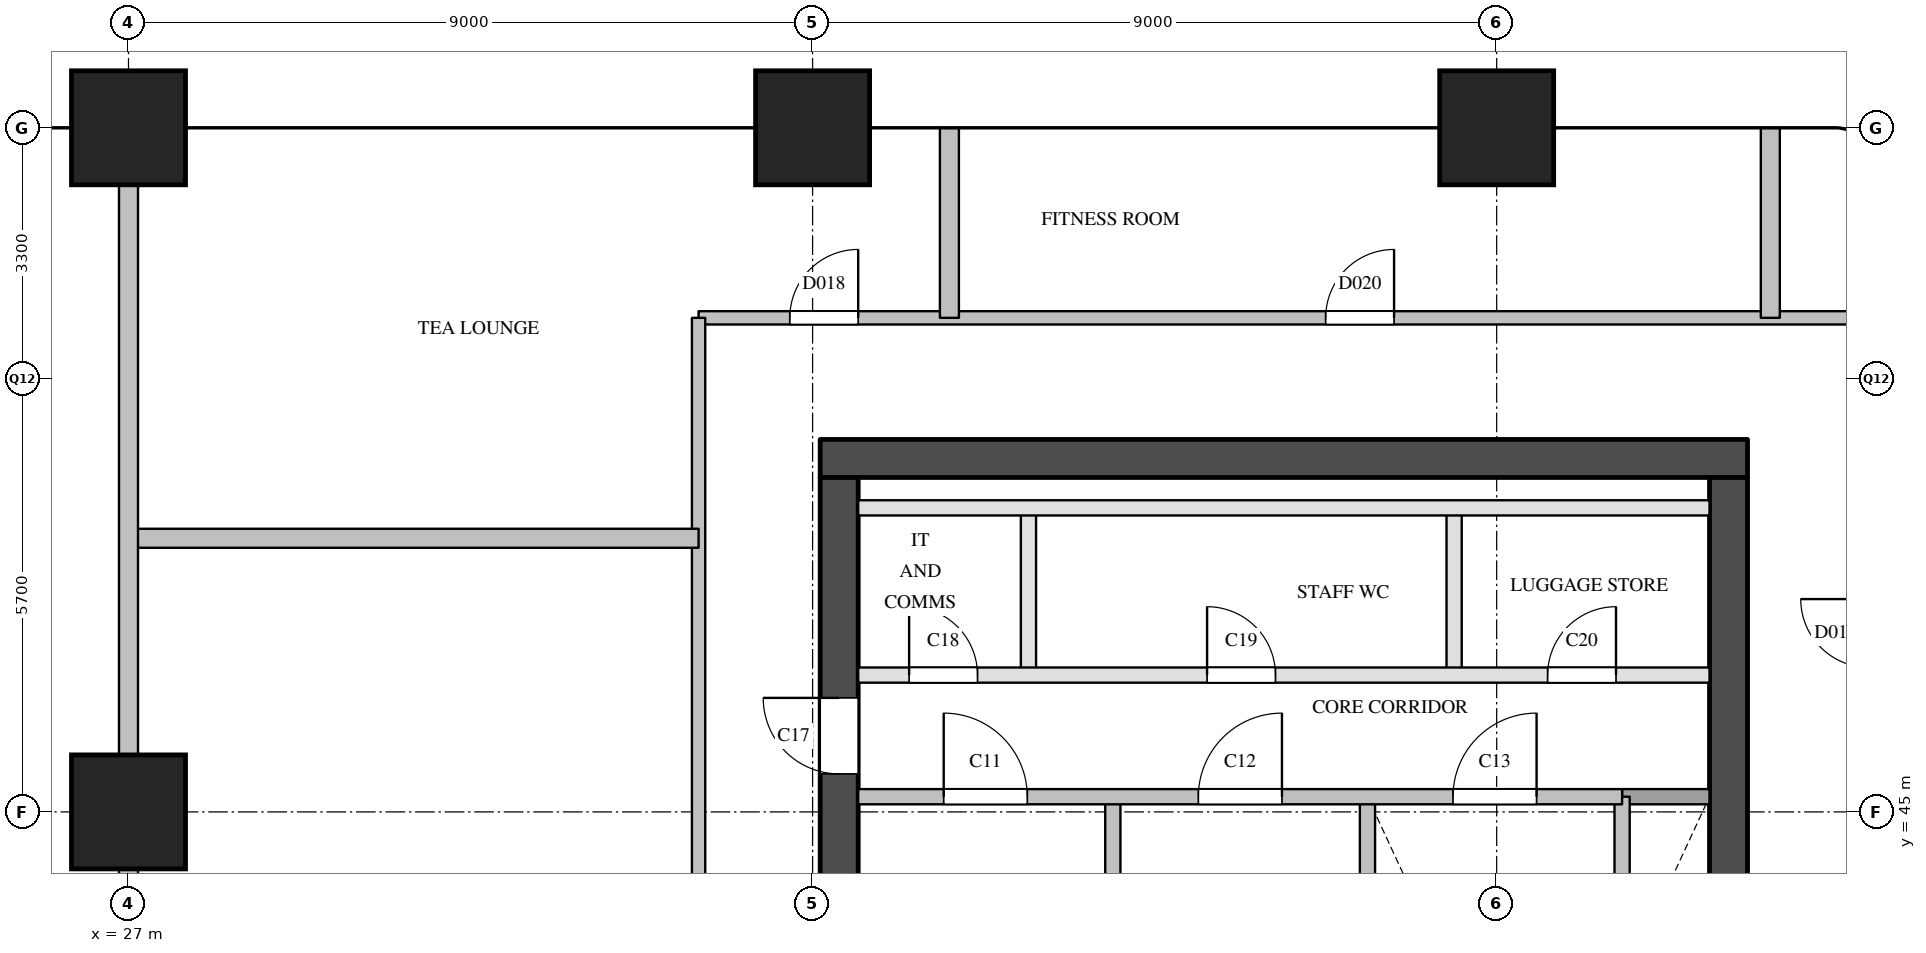
"""IFC4 building model, lengths in metres.
Left out: names, types, materials, properties, quantities, classifications, styles, units other than length and angle.
Written with IfcOpenShell. Run it as: python <this file> out.ifc"""

import sys

from ifc_helpers import new_model, si_unit, direction, frame, frame_2d, origin, origin_2d, place, context, subcontext, project, spatial, rectangle, extrude, element, fill, save


model = new_model("IFC4")
c1 = context("Model", 3, precision=1e-05, world=origin(), true_north=direction((0.0, 1.0)))
c2 = subcontext(c1, "Body", "Model", "MODEL_VIEW")
j1 = project(units=[si_unit("LENGTHUNIT", "METRE"), si_unit("PLANEANGLEUNIT", "RADIAN")], contexts=[c1])
p1 = place(None, origin())
s1 = spatial("IfcSite", under=j1, at=p1, CompositionType="ELEMENT")
p2 = place(p1, origin())
s2 = spatial("IfcBuilding", under=s1, at=p2, CompositionType="ELEMENT")
p3 = place(p2, frame((0.0, 0.0, 162.2)))
s3 = spatial("IfcBuildingStorey", under=s2, at=p3, CompositionType="ELEMENT", Elevation=162.2)
for number, where, z_axis, x_axis in (
    (1, (27.0, 45.0, 0.0), (0.0, 0.0, 1.0), (1.0, 0.0, 0.0)),
    (2, (27.0, 54.0, 0.0), (0.0, 0.0, 1.0), (1.0, 0.0, 0.0)),
    (3, (36.0, 54.0, 0.0), (0.0, 0.0, 1.0), (1.0, 0.0, 0.0)),
    (4, (45.0, 54.0, 0.0), (0.0, 0.0, 1.0), (1.0, 0.0, 0.0)),
):
    element("IfcColumn", number, at=place(p3, frame(where, z_axis=z_axis, x_axis=x_axis)), inside=s3, PredefinedType="COLUMN", context=c2, shape_type="SweptSolid", body=[
        extrude(rectangle(XDim=1.5, YDim=1.5, at=origin_2d()), origin(), (0.0, 0.0, 1.0), 3.9),
    ])
p4 = place(p3, frame((36.1, 49.65, 0.0), z_axis=(0.0, 0.0, 1.0), x_axis=(1.0, 0.0, 0.0)))
e5 = element("IfcWall", 5, at=p4, inside=s3, PredefinedType="SHEAR", context=c2, shape_type="SweptSolid", body=[
    extrude(rectangle(XDim=12.2, YDim=0.5, at=frame_2d((6.1, 0.0))), origin(), (0.0, 0.0, 1.0), 3.6),
])
p5 = place(p3, frame((36.35, 29.1, 0.0), z_axis=(0.0, 0.0, 1.0), x_axis=(0.0, 1.0, 0.0)))
e6 = element("IfcWall", 6, at=p5, inside=s3, PredefinedType="SHEAR", context=c2, shape_type="SweptSolid", body=[
    extrude(rectangle(XDim=20.3, YDim=0.5, at=frame_2d((10.15, 0.0))), origin(), (0.0, 0.0, 1.0), 3.6),
])
p6 = place(p5, frame((3.6, 0.0, 0.0)))
e7 = element("IfcOpeningElement", 7, at=p6, cuts=e6, PredefinedType="OPENING", context=c2, shape_type="SweptSolid", body=[
    extrude(rectangle(XDim=1.8, YDim=2.1, at=frame_2d((0.9, 1.05))), frame((0.0, 0.26, 0.0), z_axis=(0.0, -1.0, 0.0), x_axis=(1.0, 0.0, 0.0)), (0.0, 0.0, 1.0), 0.52),
])
p7 = place(p5, frame((16.4, 0.0, 0.0)))
e8 = element("IfcOpeningElement", 8, at=p7, cuts=e6, PredefinedType="OPENING", context=c2, shape_type="SweptSolid", body=[
    extrude(rectangle(XDim=1.0, YDim=2.1, at=frame_2d((0.5, 1.05))), frame((0.0, 0.26, 0.0), z_axis=(0.0, -1.0, 0.0), x_axis=(1.0, 0.0, 0.0)), (0.0, 0.0, 1.0), 0.52),
])
p8 = place(p3, frame((48.05, 29.1, 0.0), z_axis=(0.0, 0.0, 1.0), x_axis=(0.0, 1.0, 0.0)))
e9 = element("IfcWall", 9, at=p8, inside=s3, PredefinedType="SHEAR", context=c2, shape_type="SweptSolid", body=[
    extrude(rectangle(XDim=20.3, YDim=0.5, at=frame_2d((10.15, 0.0))), origin(), (0.0, 0.0, 1.0), 3.6),
])
p9 = place(p8, frame((12.5, 0.0, 0.0)))
e10 = element("IfcOpeningElement", 10, at=p9, cuts=e9, PredefinedType="OPENING", context=c2, shape_type="SweptSolid", body=[
    extrude(rectangle(XDim=0.7, YDim=2.1, at=frame_2d((0.35, 1.05))), frame((0.0, 0.26, 0.0), z_axis=(0.0, -1.0, 0.0), x_axis=(1.0, 0.0, 0.0)), (0.0, 0.0, 1.0), 0.52),
])
p10 = place(p8, frame((3.9, 0.0, 0.0)))
e11 = element("IfcOpeningElement", 11, at=p10, cuts=e9, PredefinedType="OPENING", context=c2, shape_type="SweptSolid", body=[
    extrude(rectangle(XDim=1.8, YDim=2.1, at=frame_2d((0.9, 1.05))), frame((0.0, 0.26, 0.0), z_axis=(0.0, -1.0, 0.0), x_axis=(1.0, 0.0, 0.0)), (0.0, 0.0, 1.0), 0.52),
])
p11 = place(p3, frame((38.84, 46.8, 0.0), z_axis=(0.0, 0.0, 1.0), x_axis=(0.0, 1.0, 0.0)))
e12 = element("IfcWall", 12, at=p11, inside=s3, PredefinedType="PARTITIONING", context=c2, shape_type="SweptSolid", body=[
    extrude(rectangle(XDim=2.2, YDim=0.2, at=frame_2d((1.1, 0.0))), origin(), (0.0, 0.0, 1.0), 3.6),
])
for number, where, z_axis, x_axis in (
    (13, (39.95, 40.78, 0.0), (0.0, 0.0, 1.0), (0.0, 1.0, 0.0)),
    (14, (43.3, 40.78, 0.0), (0.0, 0.0, 1.0), (0.0, 1.0, 0.0)),
):
    element("IfcWall", number, at=place(p3, frame(where, z_axis=z_axis, x_axis=x_axis)), inside=s3, PredefinedType="SOLIDWALL", context=c2, shape_type="SweptSolid", body=[
        extrude(rectangle(XDim=4.42, YDim=0.2, at=frame_2d((2.21, 0.0))), origin(), (0.0, 0.0, 1.0), 3.6),
    ])
p12 = place(p3, frame((44.44, 46.8, 0.0), z_axis=(0.0, 0.0, 1.0), x_axis=(0.0, 1.0, 0.0)))
e15 = element("IfcWall", 15, at=p12, inside=s3, PredefinedType="PARTITIONING", context=c2, shape_type="SweptSolid", body=[
    extrude(rectangle(XDim=2.2, YDim=0.2, at=frame_2d((1.1, 0.0))), origin(), (0.0, 0.0, 1.0), 3.6),
])
p13 = place(p3, frame((46.65, 40.78, 0.0), z_axis=(0.0, 0.0, 1.0), x_axis=(0.0, 1.0, 0.0)))
e16 = element("IfcWall", 16, at=p13, inside=s3, PredefinedType="SOLIDWALL", context=c2, shape_type="SweptSolid", body=[
    extrude(rectangle(XDim=4.42, YDim=0.2, at=frame_2d((2.21, 0.0))), origin(), (0.0, 0.0, 1.0), 3.6),
])
p14 = place(p3, frame((46.65, 45.2, 0.0), z_axis=(0.0, 0.0, 1.0), x_axis=(1.0, 0.0, 0.0)))
e17 = element("IfcWall", 17, at=p14, inside=s3, PredefinedType="SOLIDWALL", context=c2, shape_type="SweptSolid", body=[
    extrude(rectangle(XDim=1.15, YDim=0.2, at=frame_2d((0.575, 0.0))), origin(), (0.0, 0.0, 1.0), 3.6),
])
p15 = place(p3, frame((36.6, 45.2, 0.0), z_axis=(0.0, 0.0, 1.0), x_axis=(1.0, 0.0, 0.0)))
e18 = element("IfcWall", 18, at=p15, inside=s3, PredefinedType="SOLIDWALL", context=c2, shape_type="SweptSolid", body=[
    extrude(rectangle(XDim=10.05, YDim=0.2, at=frame_2d((5.025, 0.0))), origin(), (0.0, 0.0, 1.0), 3.6),
])
p16 = place(p15, frame((1.125, 0.0, 0.0)))
e19 = element("IfcOpeningElement", 19, at=p16, cuts=e18, PredefinedType="OPENING", context=c2, shape_type="SweptSolid", body=[
    extrude(rectangle(XDim=1.1, YDim=2.1, at=frame_2d((0.55, 1.05))), frame((0.0, 0.11, 0.0), z_axis=(0.0, -1.0, 0.0), x_axis=(1.0, 0.0, 0.0)), (0.0, 0.0, 1.0), 0.22),
])
p17 = place(p15, frame((4.475, 0.0, 0.0)))
e20 = element("IfcOpeningElement", 20, at=p17, cuts=e18, PredefinedType="OPENING", context=c2, shape_type="SweptSolid", body=[
    extrude(rectangle(XDim=1.1, YDim=2.1, at=frame_2d((0.55, 1.05))), frame((0.0, 0.11, 0.0), z_axis=(0.0, -1.0, 0.0), x_axis=(1.0, 0.0, 0.0)), (0.0, 0.0, 1.0), 0.22),
])
p18 = place(p15, frame((7.825, 0.0, 0.0)))
e21 = element("IfcOpeningElement", 21, at=p18, cuts=e18, PredefinedType="OPENING", context=c2, shape_type="SweptSolid", body=[
    extrude(rectangle(XDim=1.1, YDim=2.1, at=frame_2d((0.55, 1.05))), frame((0.0, 0.11, 0.0), z_axis=(0.0, -1.0, 0.0), x_axis=(1.0, 0.0, 0.0)), (0.0, 0.0, 1.0), 0.22),
])
p19 = place(p3, frame((36.6, 46.8, 0.0), z_axis=(0.0, 0.0, 1.0), x_axis=(1.0, 0.0, 0.0)))
e22 = element("IfcWall", 22, at=p19, inside=s3, PredefinedType="PARTITIONING", context=c2, shape_type="SweptSolid", body=[
    extrude(rectangle(XDim=11.2, YDim=0.2, at=frame_2d((5.6, 0.0))), origin(), (0.0, 0.0, 1.0), 3.6),
])
p20 = place(p19, frame((0.67, 0.0, 0.0)))
e23 = element("IfcOpeningElement", 23, at=p20, cuts=e22, PredefinedType="OPENING", context=c2, shape_type="SweptSolid", body=[
    extrude(rectangle(XDim=0.9, YDim=2.1, at=frame_2d((0.45, 1.05))), frame((0.0, 0.11, 0.0), z_axis=(0.0, -1.0, 0.0), x_axis=(1.0, 0.0, 0.0)), (0.0, 0.0, 1.0), 0.22),
])
p21 = place(p19, frame((4.59, 0.0, 0.0)))
e24 = element("IfcOpeningElement", 24, at=p21, cuts=e22, PredefinedType="OPENING", context=c2, shape_type="SweptSolid", body=[
    extrude(rectangle(XDim=0.9, YDim=2.1, at=frame_2d((0.45, 1.05))), frame((0.0, 0.11, 0.0), z_axis=(0.0, -1.0, 0.0), x_axis=(1.0, 0.0, 0.0)), (0.0, 0.0, 1.0), 0.22),
])
p22 = place(p19, frame((9.07, 0.0, 0.0)))
e25 = element("IfcOpeningElement", 25, at=p22, cuts=e22, PredefinedType="OPENING", context=c2, shape_type="SweptSolid", body=[
    extrude(rectangle(XDim=0.9, YDim=2.1, at=frame_2d((0.45, 1.05))), frame((0.0, 0.11, 0.0), z_axis=(0.0, -1.0, 0.0), x_axis=(1.0, 0.0, 0.0)), (0.0, 0.0, 1.0), 0.22),
])
p23 = place(p3, frame((36.6, 49.0, 0.0), z_axis=(0.0, 0.0, 1.0), x_axis=(1.0, 0.0, 0.0)))
e26 = element("IfcWall", 26, at=p23, inside=s3, PredefinedType="PARTITIONING", context=c2, shape_type="SweptSolid", body=[
    extrude(rectangle(XDim=11.2, YDim=0.2, at=frame_2d((5.6, 0.0))), origin(), (0.0, 0.0, 1.0), 3.6),
])
p24 = place(p3, frame((34.5, 51.5, 0.0), z_axis=(0.0, 0.0, 1.0), x_axis=(1.0, 0.0, 0.0)))
e27 = element("IfcWall", 27, at=p24, inside=s3, PredefinedType="PARTITIONING", context=c2, shape_type="SweptSolid", body=[
    extrude(rectangle(XDim=15.4, YDim=0.175, at=frame_2d((7.7, 0.0))), origin(), (0.0, 0.0, 1.0), 3.6),
])
p25 = place(p24, frame((1.2, 0.0, 0.0)))
e28 = element("IfcOpeningElement", 28, at=p25, cuts=e27, PredefinedType="OPENING", context=c2, shape_type="SweptSolid", body=[
    extrude(rectangle(XDim=0.9, YDim=2.1, at=frame_2d((0.45, 1.05))), frame((0.0, 0.097, 0.0), z_axis=(0.0, -1.0, 0.0), x_axis=(1.0, 0.0, 0.0)), (0.0, 0.0, 1.0), 0.195),
])
p26 = place(p24, frame((8.25, 0.0, 0.0)))
e29 = element("IfcOpeningElement", 29, at=p26, cuts=e27, PredefinedType="OPENING", context=c2, shape_type="SweptSolid", body=[
    extrude(rectangle(XDim=0.9, YDim=2.1, at=frame_2d((0.45, 1.05))), frame((0.0, 0.097, 0.0), z_axis=(0.0, -1.0, 0.0), x_axis=(1.0, 0.0, 0.0)), (0.0, 0.0, 1.0), 0.195),
])
p27 = place(p3, frame((34.5, 38.7, 0.0), z_axis=(0.0, 0.0, 1.0), x_axis=(0.0, 1.0, 0.0)))
e30 = element("IfcWall", 30, at=p27, inside=s3, PredefinedType="PARTITIONING", context=c2, shape_type="SweptSolid", body=[
    extrude(rectangle(XDim=12.8, YDim=0.175, at=frame_2d((6.4, 0.0))), origin(), (0.0, 0.0, 1.0), 3.6),
])
p28 = place(p27, frame((4.45, 0.0, 0.0)))
e31 = element("IfcOpeningElement", 31, at=p28, cuts=e30, PredefinedType="OPENING", context=c2, shape_type="SweptSolid", body=[
    extrude(rectangle(XDim=1.0, YDim=2.1, at=frame_2d((0.5, 1.05))), frame((0.0, 0.097, 0.0), z_axis=(0.0, -1.0, 0.0), x_axis=(1.0, 0.0, 0.0)), (0.0, 0.0, 1.0), 0.195),
])
p29 = place(p3, frame((27.0, 48.6, 0.0), z_axis=(0.0, 0.0, 1.0), x_axis=(1.0, 0.0, 0.0)))
e32 = element("IfcWall", 32, at=p29, inside=s3, PredefinedType="PARTITIONING", context=c2, shape_type="SweptSolid", body=[
    extrude(rectangle(XDim=7.5, YDim=0.25, at=frame_2d((3.75, 0.0))), origin(), (0.0, 0.0, 1.0), 2.6),
])
p30 = place(p3, frame((27.0, 38.7, 0.0), z_axis=(0.0, 0.0, 1.0), x_axis=(0.0, 1.0, 0.0)))
e33 = element("IfcWall", 33, at=p30, inside=s3, PredefinedType="PARTITIONING", context=c2, shape_type="SweptSolid", body=[
    extrude(rectangle(XDim=15.3, YDim=0.25, at=frame_2d((7.65, 0.0))), origin(), (0.0, 0.0, 1.0), 2.6),
])
for number, where, z_axis, x_axis in (
    (34, (37.8, 51.5, 0.0), (0.0, 0.0, 1.0), (0.0, 1.0, 0.0)),
    (35, (48.6, 51.5, 0.0), (0.0, 0.0, 1.0), (0.0, 1.0, 0.0)),
):
    element("IfcWall", number, at=place(p3, frame(where, z_axis=z_axis, x_axis=x_axis)), inside=s3, PredefinedType="PARTITIONING", context=c2, shape_type="SweptSolid", body=[
        extrude(rectangle(XDim=2.5, YDim=0.25, at=frame_2d((1.25, 0.0))), origin(), (0.0, 0.0, 1.0), 2.6),
    ])
p31 = place(p16, origin())
e36 = element("IfcDoor", 36, at=p31, inside=s3, OperationType="SINGLE_SWING_LEFT", PredefinedType="DOOR", context=c2, shape_type="SweptSolid", body=[
    extrude(rectangle(XDim=1.1, YDim=2.1, at=frame_2d((0.55, 1.05))), frame((0.0, 0.025, 0.0), z_axis=(0.0, -1.0, 0.0), x_axis=(1.0, 0.0, 0.0)), (0.0, 0.0, 1.0), 0.05),
])
fill(e19, e36)
p32 = place(p17, origin())
e37 = element("IfcDoor", 37, at=p32, inside=s3, OperationType="SINGLE_SWING_RIGHT", PredefinedType="DOOR", context=c2, shape_type="SweptSolid", body=[
    extrude(rectangle(XDim=1.1, YDim=2.1, at=frame_2d((0.55, 1.05))), frame((0.0, 0.025, 0.0), z_axis=(0.0, -1.0, 0.0), x_axis=(1.0, 0.0, 0.0)), (0.0, 0.0, 1.0), 0.05),
])
fill(e20, e37)
p33 = place(p18, origin())
e38 = element("IfcDoor", 38, at=p33, inside=s3, OperationType="SINGLE_SWING_RIGHT", PredefinedType="DOOR", context=c2, shape_type="SweptSolid", body=[
    extrude(rectangle(XDim=1.1, YDim=2.1, at=frame_2d((0.55, 1.05))), frame((0.0, 0.025, 0.0), z_axis=(0.0, -1.0, 0.0), x_axis=(1.0, 0.0, 0.0)), (0.0, 0.0, 1.0), 0.05),
])
fill(e21, e38)
p34 = place(p7, origin())
e39 = element("IfcDoor", 39, at=p34, inside=s3, OperationType="SINGLE_SWING_RIGHT", PredefinedType="DOOR", context=c2, shape_type="SweptSolid", body=[
    extrude(rectangle(XDim=1.0, YDim=2.1, at=frame_2d((0.5, 1.05))), frame((0.0, 0.025, 0.0), z_axis=(0.0, -1.0, 0.0), x_axis=(1.0, 0.0, 0.0)), (0.0, 0.0, 1.0), 0.05),
])
fill(e8, e39)
p35 = place(p20, origin())
e40 = element("IfcDoor", 40, at=p35, inside=s3, OperationType="SINGLE_SWING_LEFT", PredefinedType="DOOR", context=c2, shape_type="SweptSolid", body=[
    extrude(rectangle(XDim=0.9, YDim=2.1, at=frame_2d((0.45, 1.05))), frame((0.0, 0.025, 0.0), z_axis=(0.0, -1.0, 0.0), x_axis=(1.0, 0.0, 0.0)), (0.0, 0.0, 1.0), 0.05),
])
fill(e23, e40)
p36 = place(p21, origin())
e41 = element("IfcDoor", 41, at=p36, inside=s3, OperationType="SINGLE_SWING_LEFT", PredefinedType="DOOR", context=c2, shape_type="SweptSolid", body=[
    extrude(rectangle(XDim=0.9, YDim=2.1, at=frame_2d((0.45, 1.05))), frame((0.0, 0.025, 0.0), z_axis=(0.0, -1.0, 0.0), x_axis=(1.0, 0.0, 0.0)), (0.0, 0.0, 1.0), 0.05),
])
fill(e24, e41)
p37 = place(p22, origin())
e42 = element("IfcDoor", 42, at=p37, inside=s3, OperationType="SINGLE_SWING_RIGHT", PredefinedType="DOOR", context=c2, shape_type="SweptSolid", body=[
    extrude(rectangle(XDim=0.9, YDim=2.1, at=frame_2d((0.45, 1.05))), frame((0.0, 0.025, 0.0), z_axis=(0.0, -1.0, 0.0), x_axis=(1.0, 0.0, 0.0)), (0.0, 0.0, 1.0), 0.05),
])
fill(e25, e42)
p38 = place(p25, origin())
e43 = element("IfcDoor", 43, at=p38, inside=s3, OperationType="SINGLE_SWING_RIGHT", PredefinedType="DOOR", context=c2, shape_type="SweptSolid", body=[
    extrude(rectangle(XDim=0.9, YDim=2.1, at=frame_2d((0.45, 1.05))), frame((0.0, 0.025, 0.0), z_axis=(0.0, -1.0, 0.0), x_axis=(1.0, 0.0, 0.0)), (0.0, 0.0, 1.0), 0.05),
])
fill(e28, e43)
p39 = place(p26, origin())
e44 = element("IfcDoor", 44, at=p39, inside=s3, OperationType="SINGLE_SWING_RIGHT", PredefinedType="DOOR", context=c2, shape_type="SweptSolid", body=[
    extrude(rectangle(XDim=0.9, YDim=2.1, at=frame_2d((0.45, 1.05))), frame((0.0, 0.025, 0.0), z_axis=(0.0, -1.0, 0.0), x_axis=(1.0, 0.0, 0.0)), (0.0, 0.0, 1.0), 0.05),
])
fill(e29, e44)
save(model, sys.argv[1])
